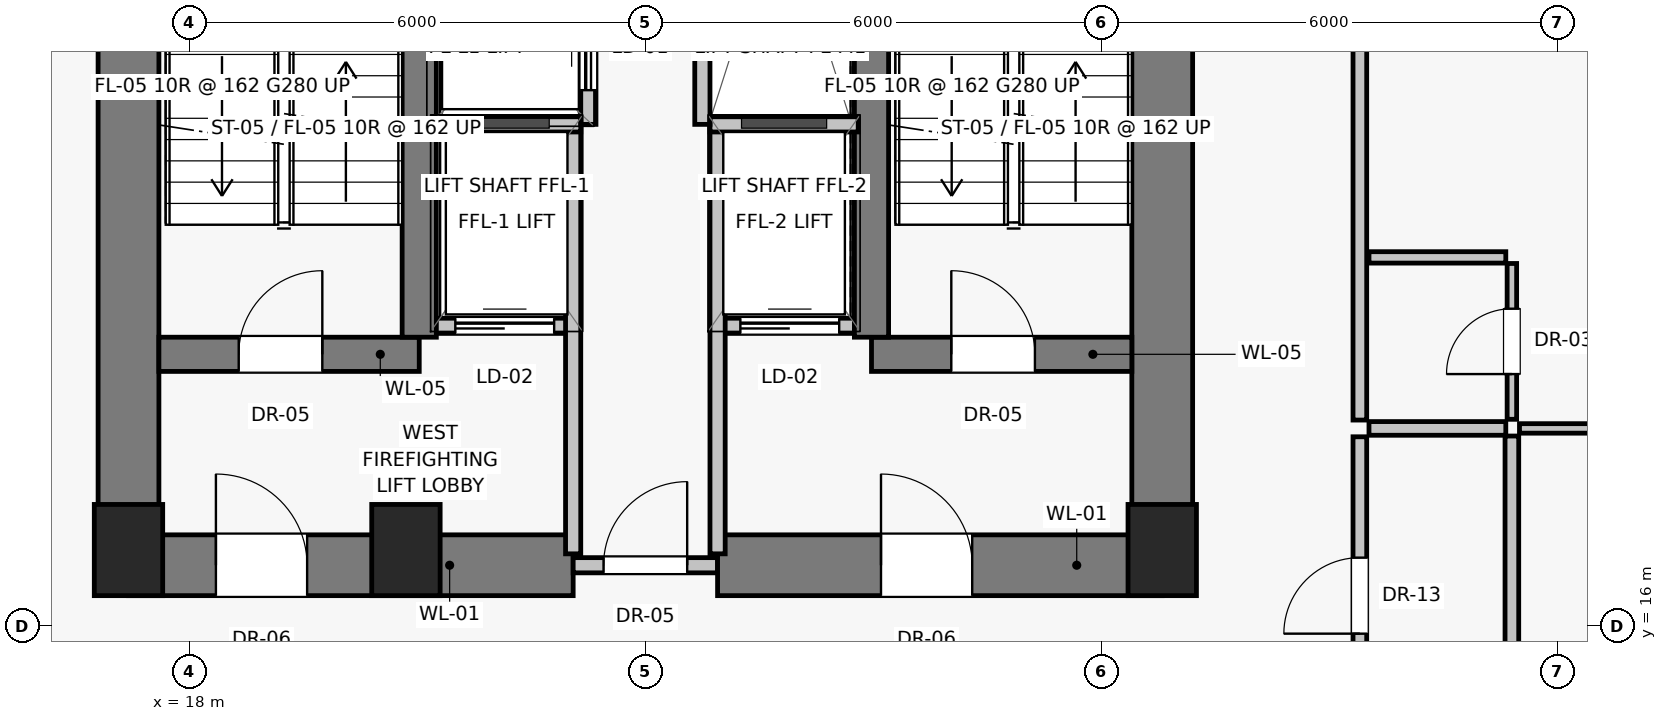
"""IFC4 building model, lengths in metres.
Left out: names, types, materials, properties, quantities, classifications, styles, units other than length and angle.
Written with IfcOpenShell. Run it as: python <this file> out.ifc"""

import sys

from ifc_helpers import new_model, si_unit, direction, frame, frame_2d, origin, origin_2d, place, context, subcontext, project, spatial, rectangle, extrude, source, transform, mapped, element, fill, save


model = new_model("IFC4")
c1 = context("Model", 3, precision=1e-05, world=origin(), true_north=direction((0.0, 1.0)))
c2 = subcontext(c1, "Body", "Model", "MODEL_VIEW")
j1 = project(units=[si_unit("LENGTHUNIT", "METRE"), si_unit("PLANEANGLEUNIT", "RADIAN")], contexts=[c1])
p1 = place(None, origin())
s1 = spatial("IfcSite", under=j1, at=p1, CompositionType="ELEMENT")
p2 = place(p1, origin())
s2 = spatial("IfcBuilding", under=s1, at=p2, CompositionType="ELEMENT")
p3 = place(p2, frame((0.0, 0.0, 60.85)))
s3 = spatial("IfcBuildingStorey", under=s2, at=p3, CompositionType="ELEMENT", Elevation=60.85)
for number, where, z_axis, x_axis in (
    (1, (17.2, 17.0, 0.0), (0.0, 0.0, 1.0), (1.0, 0.0, 0.0)),
    (2, (20.85, 17.0, 0.0), (0.0, 0.0, 1.0), (1.0, 0.0, 0.0)),
    (3, (30.8, 17.0, 0.0), (0.0, 0.0, 1.0), (1.0, 0.0, 0.0)),
):
    element("IfcColumn", number, at=place(p3, frame(where, z_axis=z_axis, x_axis=x_axis)), inside=s3, PredefinedType="PILASTER", context=c2, shape_type="SweptSolid", body=[
        extrude(rectangle(XDim=0.9, YDim=1.2, at=origin_2d()), origin(), (0.0, 0.0, 1.0), 3.25),
    ])
for number, where, z_axis, x_axis in (
    (4, (17.2, 16.8, 0.0), (0.0, 0.0, 1.0), (0.0, 1.0, 0.0)),
    (5, (30.8, 16.8, 0.0), (0.0, 0.0, 1.0), (0.0, 1.0, 0.0)),
):
    element("IfcWall", number, at=place(p3, frame(where, z_axis=z_axis, x_axis=x_axis)), inside=s3, PredefinedType="SHEAR", context=c2, shape_type="SweptSolid", body=[
        extrude(rectangle(XDim=14.2, YDim=0.8, at=frame_2d((7.1, 0.0))), origin(), (0.0, 0.0, 1.0), 3.0),
    ])
p4 = place(p3, frame((17.2, 16.8, 0.0), z_axis=(0.0, 0.0, 1.0), x_axis=(1.0, 0.0, 0.0)))
e6 = element("IfcWall", 6, at=p4, inside=s3, PredefinedType="SHEAR", context=c2, shape_type="SweptSolid", body=[
    extrude(rectangle(XDim=5.85, YDim=0.8, at=frame_2d((2.925, 0.0))), origin(), (0.0, 0.0, 1.0), 3.0),
])
p5 = place(p4, frame((1.15, 0.0, 0.0)))
e7 = element("IfcOpeningElement", 7, at=p5, cuts=e6, PredefinedType="OPENING", context=c2, shape_type="SweptSolid", body=[
    extrude(rectangle(XDim=1.2, YDim=2.03, at=frame_2d((0.6, 1.015))), frame((0.0, 0.41, 0.0), z_axis=(0.0, -1.0, 0.0), x_axis=(1.0, 0.0, 0.0)), (0.0, 0.0, 1.0), 0.82),
])
p6 = place(p3, frame((23.05, 16.8, 0.0), z_axis=(0.0, 0.0, 1.0), x_axis=(1.0, 0.0, 0.0)))
e8 = element("IfcWall", 8, at=p6, inside=s3, PredefinedType="SOLIDWALL", context=c2, shape_type="SweptSolid", body=[
    extrude(rectangle(XDim=1.9, YDim=0.2, at=frame_2d((0.95, 0.0))), origin(), (0.0, 0.0, 1.0), 2.15),
])
p7 = place(p6, frame((0.4, 0.0, 0.0)))
e9 = element("IfcOpeningElement", 9, at=p7, cuts=e8, PredefinedType="OPENING", context=c2, shape_type="SweptSolid", body=[
    extrude(rectangle(XDim=1.1, YDim=2.03, at=frame_2d((0.55, 1.015))), frame((0.0, 0.11, 0.0), z_axis=(0.0, -1.0, 0.0), x_axis=(1.0, 0.0, 0.0)), (0.0, 0.0, 1.0), 0.22),
])
p8 = place(p3, frame((24.95, 16.8, 0.0), z_axis=(0.0, 0.0, 1.0), x_axis=(1.0, 0.0, 0.0)))
e10 = element("IfcWall", 10, at=p8, inside=s3, PredefinedType="SHEAR", context=c2, shape_type="SweptSolid", body=[
    extrude(rectangle(XDim=5.85, YDim=0.8, at=frame_2d((2.925, 0.0))), origin(), (0.0, 0.0, 1.0), 3.0),
])
p9 = place(p8, frame((2.15, 0.0, 0.0)))
e11 = element("IfcOpeningElement", 11, at=p9, cuts=e10, PredefinedType="OPENING", context=c2, shape_type="SweptSolid", body=[
    extrude(rectangle(XDim=1.2, YDim=2.03, at=frame_2d((0.6, 1.015))), frame((0.0, 0.41, 0.0), z_axis=(0.0, -1.0, 0.0), x_axis=(1.0, 0.0, 0.0)), (0.0, 0.0, 1.0), 0.82),
])
p10 = place(p3, frame((17.6, 19.575, 0.0), z_axis=(0.0, 0.0, 1.0), x_axis=(1.0, 0.0, 0.0)))
e12 = element("IfcWall", 12, at=p10, inside=s3, PredefinedType="SHEAR", context=c2, shape_type="SweptSolid", body=[
    extrude(rectangle(XDim=3.425, YDim=0.45, at=frame_2d((1.712, 0.0))), origin(), (0.0, 0.0, 1.0), 3.0),
])
p11 = place(p10, frame((1.05, 0.0, 0.0)))
e13 = element("IfcOpeningElement", 13, at=p11, cuts=e12, PredefinedType="OPENING", context=c2, shape_type="SweptSolid", body=[
    extrude(rectangle(XDim=1.1, YDim=2.03, at=frame_2d((0.55, 1.015))), frame((0.0, 0.235, 0.0), z_axis=(0.0, -1.0, 0.0), x_axis=(1.0, 0.0, 0.0)), (0.0, 0.0, 1.0), 0.47),
])
p12 = place(p3, frame((21.2, 19.95, 0.0), z_axis=(0.0, 0.0, 1.0), x_axis=(1.0, 0.0, 0.0)))
e14 = element("IfcWall", 14, at=p12, inside=s3, PredefinedType="SOLIDWALL", context=c2, shape_type="SweptSolid", body=[
    extrude(rectangle(XDim=1.85, YDim=0.2, at=frame_2d((0.925, 0.0))), origin(), (0.0, 0.0, 1.0), 3.0),
])
p13 = place(p12, frame((0.3, 0.0, 0.0)))
e15 = element("IfcOpeningElement", 15, at=p13, cuts=e14, PredefinedType="OPENING", context=c2, shape_type="SweptSolid", body=[
    extrude(rectangle(XDim=1.3, YDim=2.25, at=frame_2d((0.65, 1.125))), frame((0.0, 0.11, 0.0), z_axis=(0.0, -1.0, 0.0), x_axis=(1.0, 0.0, 0.0)), (0.0, 0.0, 1.0), 0.22),
])
p14 = place(p3, frame((24.95, 19.95, 0.0), z_axis=(0.0, 0.0, 1.0), x_axis=(1.0, 0.0, 0.0)))
e16 = element("IfcWall", 16, at=p14, inside=s3, PredefinedType="SOLIDWALL", context=c2, shape_type="SweptSolid", body=[
    extrude(rectangle(XDim=1.85, YDim=0.2, at=frame_2d((0.925, 0.0))), origin(), (0.0, 0.0, 1.0), 3.0),
])
p15 = place(p14, frame((0.3, 0.0, 0.0)))
e17 = element("IfcOpeningElement", 17, at=p15, cuts=e16, PredefinedType="OPENING", context=c2, shape_type="SweptSolid", body=[
    extrude(rectangle(XDim=1.3, YDim=2.25, at=frame_2d((0.65, 1.125))), frame((0.0, 0.11, 0.0), z_axis=(0.0, -1.0, 0.0), x_axis=(1.0, 0.0, 0.0)), (0.0, 0.0, 1.0), 0.22),
])
p16 = place(p3, frame((26.975, 19.575, 0.0), z_axis=(0.0, 0.0, 1.0), x_axis=(1.0, 0.0, 0.0)))
e18 = element("IfcWall", 18, at=p16, inside=s3, PredefinedType="SHEAR", context=c2, shape_type="SweptSolid", body=[
    extrude(rectangle(XDim=3.425, YDim=0.45, at=frame_2d((1.712, 0.0))), origin(), (0.0, 0.0, 1.0), 3.0),
])
p17 = place(p16, frame((1.05, 0.0, 0.0)))
e19 = element("IfcOpeningElement", 19, at=p17, cuts=e18, PredefinedType="OPENING", context=c2, shape_type="SweptSolid", body=[
    extrude(rectangle(XDim=1.1, YDim=2.03, at=frame_2d((0.55, 1.015))), frame((0.0, 0.235, 0.0), z_axis=(0.0, -1.0, 0.0), x_axis=(1.0, 0.0, 0.0)), (0.0, 0.0, 1.0), 0.47),
])
for number, where, z_axis, x_axis in (
    (20, (21.025, 19.8, 0.0), (0.0, 0.0, 1.0), (0.0, 1.0, 0.0)),
    (21, (26.975, 19.8, 0.0), (0.0, 0.0, 1.0), (0.0, 1.0, 0.0)),
):
    element("IfcWall", number, at=place(p3, frame(where, z_axis=z_axis, x_axis=x_axis)), inside=s3, PredefinedType="SHEAR", context=c2, shape_type="SweptSolid", body=[
        extrude(rectangle(XDim=8.825, YDim=0.45, at=frame_2d((4.413, 0.0))), origin(), (0.0, 0.0, 1.0), 3.0),
    ])
for number, where, z_axis, x_axis in (
    (22, (23.05, 16.95, 0.0), (0.0, 0.0, 1.0), (0.0, 1.0, 0.0)),
    (23, (24.95, 16.95, 0.0), (0.0, 0.0, 1.0), (0.0, 1.0, 0.0)),
):
    element("IfcWall", number, at=place(p3, frame(where, z_axis=z_axis, x_axis=x_axis)), inside=s3, PredefinedType="SOLIDWALL", context=c2, shape_type="SweptSolid", body=[
        extrude(rectangle(XDim=5.6, YDim=0.2, at=frame_2d((2.8, 0.0))), origin(), (0.0, 0.0, 1.0), 3.0),
    ])
for number, where, z_axis, x_axis in (
    (24, (21.2, 22.6, 0.0), (0.0, 0.0, 1.0), (1.0, 0.0, 0.0)),
    (25, (24.85, 22.6, 0.0), (0.0, 0.0, 1.0), (1.0, 0.0, 0.0)),
):
    element("IfcWall", number, at=place(p3, frame(where, z_axis=z_axis, x_axis=x_axis)), inside=s3, PredefinedType="SOLIDWALL", context=c2, shape_type="SweptSolid", body=[
        extrude(rectangle(XDim=1.95, YDim=0.2, at=frame_2d((0.975, 0.0))), origin(), (0.0, 0.0, 1.0), 3.0),
    ])
p18 = place(p3, frame((23.25, 22.6, 0.0), z_axis=(0.0, 0.0, 1.0), x_axis=(0.0, 1.0, 0.0)))
e26 = element("IfcWall", 26, at=p18, inside=s3, PredefinedType="SOLIDWALL", context=c2, shape_type="SweptSolid", body=[
    extrude(rectangle(XDim=5.95, YDim=0.2, at=frame_2d((2.975, 0.0))), origin(), (0.0, 0.0, 1.0), 3.0),
])
p19 = place(p18, frame((0.45, 0.0, 0.0)))
e27 = element("IfcOpeningElement", 27, at=p19, cuts=e26, PredefinedType="OPENING", context=c2, shape_type="SweptSolid", body=[
    extrude(rectangle(XDim=1.1, YDim=2.08, at=frame_2d((0.55, 1.04))), frame((0.0, 0.11, 0.0), z_axis=(0.0, -1.0, 0.0), x_axis=(1.0, 0.0, 0.0)), (0.0, 0.0, 1.0), 0.22),
])
p20 = place(p18, frame((2.4, 0.0, 0.0)))
e28 = element("IfcOpeningElement", 28, at=p20, cuts=e26, PredefinedType="OPENING", context=c2, shape_type="SweptSolid", body=[
    extrude(rectangle(XDim=1.1, YDim=2.08, at=frame_2d((0.55, 1.04))), frame((0.0, 0.11, 0.0), z_axis=(0.0, -1.0, 0.0), x_axis=(1.0, 0.0, 0.0)), (0.0, 0.0, 1.0), 0.22),
])
p21 = place(p18, frame((4.35, 0.0, 0.0)))
e29 = element("IfcOpeningElement", 29, at=p21, cuts=e26, PredefinedType="OPENING", context=c2, shape_type="SweptSolid", body=[
    extrude(rectangle(XDim=1.1, YDim=2.08, at=frame_2d((0.55, 1.04))), frame((0.0, 0.11, 0.0), z_axis=(0.0, -1.0, 0.0), x_axis=(1.0, 0.0, 0.0)), (0.0, 0.0, 1.0), 0.22),
])
p22 = place(p3, frame((24.75, 22.6, 0.0), z_axis=(0.0, 0.0, 1.0), x_axis=(0.0, 1.0, 0.0)))
e30 = element("IfcWall", 30, at=p22, inside=s3, PredefinedType="SOLIDWALL", context=c2, shape_type="SweptSolid", body=[
    extrude(rectangle(XDim=5.95, YDim=0.2, at=frame_2d((2.975, 0.0))), origin(), (0.0, 0.0, 1.0), 3.0),
])
p23 = place(p3, frame((33.4, 14.31, 0.0), z_axis=(0.0, 0.0, 1.0), x_axis=(0.0, 1.0, 0.0)))
e31 = element("IfcWall", 31, at=p23, inside=s3, PredefinedType="PARTITIONING", context=c2, shape_type="SweptSolid", body=[
    extrude(rectangle(XDim=4.18, YDim=0.18, at=frame_2d((2.09, 0.0))), origin(), (0.0, 0.0, 1.0), 3.0),
])
p24 = place(p23, frame((1.59, 0.0, 0.0)))
e32 = element("IfcOpeningElement", 32, at=p24, cuts=e31, PredefinedType="OPENING", context=c2, shape_type="SweptSolid", body=[
    extrude(rectangle(XDim=1.0, YDim=2.01, at=frame_2d((0.5, 1.005))), frame((0.0, 0.1, 0.0), z_axis=(0.0, -1.0, 0.0), x_axis=(1.0, 0.0, 0.0)), (0.0, 0.0, 1.0), 0.2),
])
p25 = place(p3, frame((33.4, 18.71, 0.0), z_axis=(0.0, 0.0, 1.0), x_axis=(0.0, 1.0, 0.0)))
e33 = element("IfcWall", 33, at=p25, inside=s3, PredefinedType="PARTITIONING", context=c2, shape_type="SweptSolid", body=[
    extrude(rectangle(XDim=14.78, YDim=0.18, at=frame_2d((7.39, 0.0))), origin(), (0.0, 0.0, 1.0), 3.0),
])
p26 = place(p25, frame((5.94, 0.0, 0.0)))
e34 = element("IfcOpeningElement", 34, at=p26, cuts=e33, PredefinedType="OPENING", context=c2, shape_type="SweptSolid", body=[
    extrude(rectangle(XDim=0.95, YDim=2.02, at=frame_2d((0.475, 1.01))), frame((0.0, 0.1, 0.0), z_axis=(0.0, -1.0, 0.0), x_axis=(1.0, 0.0, 0.0)), (0.0, 0.0, 1.0), 0.2),
])
p27 = place(p3, frame((35.4, 14.32, 0.0), z_axis=(0.0, 0.0, 1.0), x_axis=(0.0, 1.0, 0.0)))
e35 = element("IfcWall", 35, at=p27, inside=s3, PredefinedType="PARTITIONING", context=c2, shape_type="SweptSolid", body=[
    extrude(rectangle(XDim=4.18, YDim=0.18, at=frame_2d((2.09, 0.0))), origin(), (0.0, 0.0, 1.0), 3.0),
])
p28 = place(p3, frame((33.52, 18.6, 0.0), z_axis=(0.0, 0.0, 1.0), x_axis=(1.0, 0.0, 0.0)))
e36 = element("IfcWall", 36, at=p28, inside=s3, PredefinedType="PARTITIONING", context=c2, shape_type="SweptSolid", body=[
    extrude(rectangle(XDim=1.8, YDim=0.18, at=frame_2d((0.9, 0.0))), origin(), (0.0, 0.0, 1.0), 3.0),
])
p29 = place(p3, frame((35.5, 18.6, 0.0), z_axis=(0.0, 0.0, 1.0), x_axis=(1.0, 0.0, 0.0)))
e37 = element("IfcWall", 37, at=p29, inside=s3, PredefinedType="PARTITIONING", context=c2, shape_type="SweptSolid", body=[
    extrude(rectangle(XDim=5.22, YDim=0.125, at=frame_2d((2.61, 0.0))), origin(), (0.0, 0.0, 1.0), 2.299),
])
p30 = place(p29, frame((1.533, 0.0, 0.0)))
e38 = element("IfcOpeningElement", 38, at=p30, cuts=e37, PredefinedType="OPENING", context=c2, shape_type="SweptSolid", body=[
    extrude(rectangle(XDim=0.9, YDim=2.01, at=frame_2d((0.45, 1.005))), frame((0.0, 0.073, 0.0), z_axis=(0.0, -1.0, 0.0), x_axis=(1.0, 0.0, 0.0)), (0.0, 0.0, 1.0), 0.145),
])
p31 = place(p3, frame((33.52, 20.85, 0.0), z_axis=(0.0, 0.0, 1.0), x_axis=(1.0, 0.0, 0.0)))
e39 = element("IfcWall", 39, at=p31, inside=s3, PredefinedType="PARTITIONING", context=c2, shape_type="SweptSolid", body=[
    extrude(rectangle(XDim=1.8, YDim=0.15, at=frame_2d((0.9, 0.0))), origin(), (0.0, 0.0, 1.0), 3.0),
])
p32 = place(p3, frame((35.4, 18.72, 0.0), z_axis=(0.0, 0.0, 1.0), x_axis=(0.0, 1.0, 0.0)))
e40 = element("IfcWall", 40, at=p32, inside=s3, PredefinedType="PARTITIONING", context=c2, shape_type="SweptSolid", body=[
    extrude(rectangle(XDim=2.05, YDim=0.125, at=frame_2d((1.025, 0.0))), origin(), (0.0, 0.0, 1.0), 3.0),
])
p33 = place(p32, frame((0.595, 0.0, 0.0)))
e41 = element("IfcOpeningElement", 41, at=p33, cuts=e40, PredefinedType="OPENING", context=c2, shape_type="SweptSolid", body=[
    extrude(rectangle(XDim=0.86, YDim=2.01, at=frame_2d((0.43, 1.005))), frame((0.0, 0.073, 0.0), z_axis=(0.0, -1.0, 0.0), x_axis=(1.0, 0.0, 0.0)), (0.0, 0.0, 1.0), 0.145),
])
m1 = source(origin(), c2, "Body", "SweptSolid", [
    extrude(rectangle(XDim=1.2, YDim=2.03, at=frame_2d((0.6, 1.015))), frame((0.0, 0.025, 0.0), z_axis=(0.0, -1.0, 0.0), x_axis=(1.0, 0.0, 0.0)), (0.0, 0.0, 1.0), 0.05),
])
p34 = place(p5, origin())
e42 = element("IfcDoor", 42, at=p34, inside=s3, OperationType="SINGLE_SWING_LEFT", PredefinedType="DOOR", context=c2, shape_type="MappedRepresentation", body=[
    mapped(m1, transform((0.0, 0.0, 0.0), scale=1.0)),
])
fill(e7, e42)
m2 = source(origin(), c2, "Body", "SweptSolid", [
    extrude(rectangle(XDim=1.1, YDim=2.03, at=frame_2d((0.55, 1.015))), frame((0.0, 0.025, 0.0), z_axis=(0.0, -1.0, 0.0), x_axis=(1.0, 0.0, 0.0)), (0.0, 0.0, 1.0), 0.05),
])
p35 = place(p7, origin())
e43 = element("IfcDoor", 43, at=p35, inside=s3, OperationType="SINGLE_SWING_RIGHT", PredefinedType="DOOR", context=c2, shape_type="MappedRepresentation", body=[
    mapped(m2, transform((0.0, 0.0, 0.0), scale=1.0)),
])
fill(e9, e43)
p36 = place(p9, origin())
e44 = element("IfcDoor", 44, at=p36, inside=s3, OperationType="SINGLE_SWING_LEFT", PredefinedType="DOOR", context=c2, shape_type="MappedRepresentation", body=[
    mapped(m1, transform((0.0, 0.0, 0.0), scale=1.0)),
])
fill(e11, e44)
p37 = place(p11, origin())
e45 = element("IfcDoor", 45, at=p37, inside=s3, OperationType="SINGLE_SWING_RIGHT", PredefinedType="DOOR", context=c2, shape_type="MappedRepresentation", body=[
    mapped(m2, transform((0.0, 0.0, 0.0), scale=1.0)),
])
fill(e13, e45)
m3 = source(origin(), c2, "Body", "SweptSolid", [
    extrude(rectangle(XDim=1.3, YDim=2.25, at=frame_2d((0.65, 1.125))), frame((0.0, 0.025, 0.0), z_axis=(0.0, -1.0, 0.0), x_axis=(1.0, 0.0, 0.0)), (0.0, 0.0, 1.0), 0.05),
])
p38 = place(p13, origin())
e46 = element("IfcDoor", 46, at=p38, inside=s3, OperationType="SLIDING_TO_LEFT", PredefinedType="DOOR", context=c2, shape_type="MappedRepresentation", body=[
    mapped(m3, transform((0.0, 0.0, 0.0), scale=1.0)),
])
fill(e15, e46)
p39 = place(p15, origin())
e47 = element("IfcDoor", 47, at=p39, inside=s3, OperationType="SLIDING_TO_LEFT", PredefinedType="DOOR", context=c2, shape_type="MappedRepresentation", body=[
    mapped(m3, transform((0.0, 0.0, 0.0), scale=1.0)),
])
fill(e17, e47)
p40 = place(p17, origin())
e48 = element("IfcDoor", 48, at=p40, inside=s3, OperationType="SINGLE_SWING_LEFT", PredefinedType="DOOR", context=c2, shape_type="MappedRepresentation", body=[
    mapped(m2, transform((0.0, 0.0, 0.0), scale=1.0)),
])
fill(e19, e48)
m4 = source(origin(), c2, "Body", "SweptSolid", [
    extrude(rectangle(XDim=1.1, YDim=2.08, at=frame_2d((0.55, 1.04))), frame((0.0, 0.025, 0.0), z_axis=(0.0, -1.0, 0.0), x_axis=(1.0, 0.0, 0.0)), (0.0, 0.0, 1.0), 0.05),
])
p41 = place(p19, origin())
e49 = element("IfcDoor", 49, at=p41, inside=s3, OperationType="SLIDING_TO_LEFT", PredefinedType="DOOR", context=c2, shape_type="MappedRepresentation", body=[
    mapped(m4, transform((0.0, 0.0, 0.0), scale=1.0)),
])
fill(e27, e49)
m5 = source(origin(), c2, "Body", "SweptSolid", [
    extrude(rectangle(XDim=1.0, YDim=2.01, at=frame_2d((0.5, 1.005))), frame((0.0, 0.025, 0.0), z_axis=(0.0, -1.0, 0.0), x_axis=(1.0, 0.0, 0.0)), (0.0, 0.0, 1.0), 0.05),
])
p42 = place(p24, origin())
e50 = element("IfcDoor", 50, at=p42, inside=s3, OperationType="SINGLE_SWING_LEFT", PredefinedType="DOOR", context=c2, shape_type="MappedRepresentation", body=[
    mapped(m5, transform((0.0, 0.0, 0.0), scale=1.0)),
])
fill(e32, e50)
m6 = source(origin(), c2, "Body", "SweptSolid", [
    extrude(rectangle(XDim=0.86, YDim=2.01, at=frame_2d((0.43, 1.005))), frame((0.0, 0.025, 0.0), z_axis=(0.0, -1.0, 0.0), x_axis=(1.0, 0.0, 0.0)), (0.0, 0.0, 1.0), 0.05),
])
p43 = place(p33, origin())
e51 = element("IfcDoor", 51, at=p43, inside=s3, OperationType="SINGLE_SWING_LEFT", PredefinedType="DOOR", context=c2, shape_type="MappedRepresentation", body=[
    mapped(m6, transform((0.0, 0.0, 0.0), scale=1.0)),
])
fill(e41, e51)
save(model, sys.argv[1])
